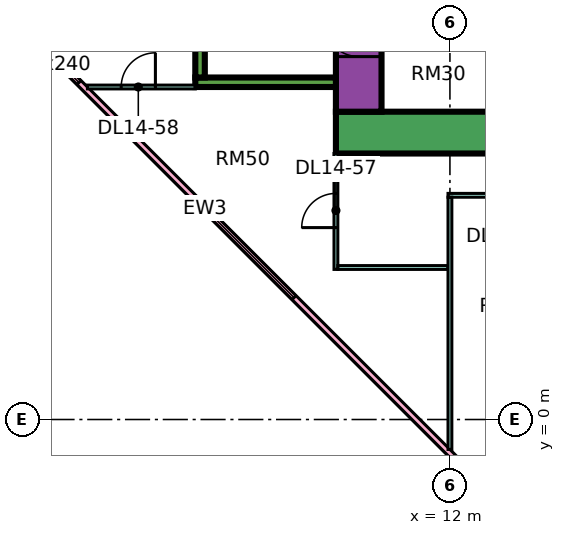
"""IFC4 building model, lengths in metres.
Left out: names, types, materials, properties, quantities, classifications, styles, units other than length and angle.
Written with IfcOpenShell. Run it as: python <this file> out.ifc"""

import sys

from ifc_helpers import new_model, si_unit, direction, frame, frame_2d, origin, place, context, subcontext, project, spatial, rectangle, extrude, element, fill, save


model = new_model("IFC4")
c1 = context("Model", 3, precision=1e-05, world=origin(), true_north=direction((0.0, 1.0)))
c2 = subcontext(c1, "Body", "Model", "MODEL_VIEW")
j1 = project(units=[si_unit("LENGTHUNIT", "METRE"), si_unit("PLANEANGLEUNIT", "RADIAN")], contexts=[c1])
p1 = place(None, origin())
s1 = spatial("IfcSite", under=j1, at=p1, CompositionType="ELEMENT")
p2 = place(p1, origin())
s2 = spatial("IfcBuilding", under=s1, at=p2, CompositionType="ELEMENT")
p3 = place(p2, frame((0.0, 0.0, 67.65)))
s3 = spatial("IfcBuildingStorey", under=s2, at=p3, CompositionType="ELEMENT", Elevation=67.65)
p4 = place(p3, frame((9.0, 7.55, 0.0), z_axis=(0.0, 0.0, 1.0), x_axis=(1.0, 0.0, 0.0)))
e1 = element("IfcWall", 1, at=p4, inside=s3, PredefinedType="SHEAR", context=c2, shape_type="SweptSolid", body=[
    extrude(rectangle(XDim=25.0, YDim=1.1, at=frame_2d((12.5, 0.0))), origin(), (0.0, 0.0, 1.0), 3.75),
])
p5 = place(p3, frame((9.6, 8.1, 0.0), z_axis=(0.0, 0.0, 1.0), x_axis=(0.0, 1.0, 0.0)))
e2 = element("IfcWall", 2, at=p5, inside=s3, PredefinedType="SHEAR", context=c2, shape_type="SweptSolid", body=[
    extrude(rectangle(XDim=10.8, YDim=1.2, at=frame_2d((5.4, 0.0))), origin(), (0.0, 0.0, 1.0), 3.75),
])
p6 = place(p5, frame((3.775, 0.0, 0.0)))
e3 = element("IfcOpeningElement", 3, at=p6, cuts=e2, PredefinedType="OPENING", context=c2, shape_type="SweptSolid", body=[
    extrude(rectangle(XDim=1.1, YDim=2.2, at=frame_2d((0.55, 1.1))), frame((0.0, 0.61, 0.0), z_axis=(0.0, -1.0, 0.0), x_axis=(1.0, 0.0, 0.0)), (0.0, 0.0, 1.0), 1.22),
])
p7 = place(p5, frame((6.275, 0.0, 0.0)))
e4 = element("IfcOpeningElement", 4, at=p7, cuts=e2, PredefinedType="OPENING", context=c2, shape_type="SweptSolid", body=[
    extrude(rectangle(XDim=1.1, YDim=2.2, at=frame_2d((0.55, 1.1))), frame((0.0, 0.61, 0.0), z_axis=(0.0, -1.0, 0.0), x_axis=(1.0, 0.0, 0.0)), (0.0, 0.0, 1.0), 1.22),
])
p8 = place(p5, frame((8.95, 0.0, 0.0)))
e5 = element("IfcOpeningElement", 5, at=p8, cuts=e2, PredefinedType="OPENING", context=c2, shape_type="SweptSolid", body=[
    extrude(rectangle(XDim=1.1, YDim=2.2, at=frame_2d((0.55, 1.1))), frame((0.0, 0.61, 0.0), z_axis=(0.0, -1.0, 0.0), x_axis=(1.0, 0.0, 0.0)), (0.0, 0.0, 1.0), 1.22),
])
p9 = place(p5, frame((1.45, 0.0, 0.0)))
e6 = element("IfcOpeningElement", 6, at=p9, cuts=e2, PredefinedType="OPENING", context=c2, shape_type="SweptSolid", body=[
    extrude(rectangle(XDim=0.9, YDim=2.1, at=frame_2d((0.45, 1.05))), frame((0.0, 0.61, 0.0), z_axis=(0.0, -1.0, 0.0), x_axis=(1.0, 0.0, 0.0)), (0.0, 0.0, 1.0), 1.22),
])
p10 = place(p3, frame((5.3, 8.875, 0.0), z_axis=(0.0, 0.0, 1.0), x_axis=(1.0, 0.0, 0.0)))
e7 = element("IfcWall", 7, at=p10, inside=s3, PredefinedType="SHEAR", context=c2, shape_type="SweptSolid", body=[
    extrude(rectangle(XDim=3.7, YDim=0.25, at=frame_2d((1.85, 0.0))), origin(), (0.0, 0.0, 1.0), 3.75),
])
p11 = place(p3, frame((5.425, 9.0, 0.0), z_axis=(0.0, 0.0, 1.0), x_axis=(0.0, 1.0, 0.0)))
e8 = element("IfcWall", 8, at=p11, inside=s3, PredefinedType="SHEAR", context=c2, shape_type="SweptSolid", body=[
    extrude(rectangle(XDim=4.0, YDim=0.25, at=frame_2d((2.0, 0.0))), origin(), (0.0, 0.0, 1.0), 3.75),
])
p12 = place(p3, frame((-1.447, 12.553, 0.0), z_axis=(0.0, 0.0, 1.0), x_axis=(0.707106781187, -0.707106781187, 0.0)))
e9 = element("IfcWall", 9, at=p12, inside=s3, PredefinedType="SOLIDWALL", context=c2, shape_type="SweptSolid", body=[
    extrude(rectangle(XDim=19.799, YDim=0.15, at=frame_2d((9.899, 0.0))), origin(), (0.0, 0.0, 1.0), 3.35),
])
p13 = place(p12, frame((2.212, 0.0, 0.45)))
e10 = element("IfcOpeningElement", 10, at=p13, cuts=e9, PredefinedType="OPENING", context=c2, shape_type="SweptSolid", body=[
    extrude(rectangle(XDim=3.0, YDim=2.4, at=frame_2d((1.5, 1.2))), frame((0.0, 0.085, 0.0), z_axis=(0.0, -1.0, 0.0), x_axis=(1.0, 0.0, 0.0)), (0.0, 0.0, 1.0), 0.17),
])
p14 = place(p12, frame((10.216, 0.0, 0.45)))
e11 = element("IfcOpeningElement", 11, at=p14, cuts=e9, PredefinedType="OPENING", context=c2, shape_type="SweptSolid", body=[
    extrude(rectangle(XDim=3.0, YDim=2.4, at=frame_2d((1.5, 1.2))), frame((0.0, 0.085, 0.0), z_axis=(0.0, -1.0, 0.0), x_axis=(1.0, 0.0, 0.0)), (0.0, 0.0, 1.0), 0.17),
])
p15 = place(p3, frame((2.461, 8.75, 0.0), z_axis=(0.0, 0.0, 1.0), x_axis=(1.0, 0.0, 0.0)))
e12 = element("IfcWall", 12, at=p15, inside=s3, PredefinedType="PARTITIONING", context=c2, shape_type="SweptSolid", body=[
    extrude(rectangle(XDim=2.839, YDim=0.1, at=frame_2d((1.419, 0.0))), origin(), (0.0, 0.0, 1.0), 3.35),
])
p16 = place(p15, frame((0.889, 0.0, 0.0)))
e13 = element("IfcOpeningElement", 13, at=p16, cuts=e12, PredefinedType="OPENING", context=c2, shape_type="SweptSolid", body=[
    extrude(rectangle(XDim=0.9, YDim=2.1, at=frame_2d((0.45, 1.05))), frame((0.0, 0.06, 0.0), z_axis=(0.0, -1.0, 0.0), x_axis=(1.0, 0.0, 0.0)), (0.0, 0.0, 1.0), 0.12),
])
p17 = place(p3, frame((9.0, 3.95, 0.0), z_axis=(0.0, 0.0, 1.0), x_axis=(0.0, 1.0, 0.0)))
e14 = element("IfcWall", 14, at=p17, inside=s3, PredefinedType="PARTITIONING", context=c2, shape_type="SweptSolid", body=[
    extrude(rectangle(XDim=3.05, YDim=0.1, at=frame_2d((1.525, 0.0))), origin(), (0.0, 0.0, 1.0), 3.35),
])
p18 = place(p17, frame((1.1, 0.0, 0.0)))
e15 = element("IfcOpeningElement", 15, at=p18, cuts=e14, PredefinedType="OPENING", context=c2, shape_type="SweptSolid", body=[
    extrude(rectangle(XDim=0.9, YDim=2.1, at=frame_2d((0.45, 1.05))), frame((0.0, 0.06, 0.0), z_axis=(0.0, -1.0, 0.0), x_axis=(1.0, 0.0, 0.0)), (0.0, 0.0, 1.0), 0.12),
])
p19 = place(p3, frame((9.05, 4.0, 0.0), z_axis=(0.0, 0.0, 1.0), x_axis=(1.0, 0.0, 0.0)))
e16 = element("IfcWall", 16, at=p19, inside=s3, PredefinedType="PARTITIONING", context=c2, shape_type="SweptSolid", body=[
    extrude(rectangle(XDim=2.9, YDim=0.1, at=frame_2d((1.45, 0.0))), origin(), (0.0, 0.0, 1.0), 3.35),
])
p20 = place(p3, frame((11.95, 5.9, 0.0), z_axis=(0.0, 0.0, 1.0), x_axis=(1.0, 0.0, 0.0)))
e17 = element("IfcWall", 17, at=p20, inside=s3, PredefinedType="PARTITIONING", context=c2, shape_type="SweptSolid", body=[
    extrude(rectangle(XDim=21.1, YDim=0.1, at=frame_2d((10.55, 0.0))), origin(), (0.0, 0.0, 1.0), 3.35),
])
p21 = place(p20, frame((1.1, 0.0, 0.0)))
e18 = element("IfcOpeningElement", 18, at=p21, cuts=e17, PredefinedType="OPENING", context=c2, shape_type="SweptSolid", body=[
    extrude(rectangle(XDim=0.9, YDim=2.1, at=frame_2d((0.45, 1.05))), frame((0.0, 0.06, 0.0), z_axis=(0.0, -1.0, 0.0), x_axis=(1.0, 0.0, 0.0)), (0.0, 0.0, 1.0), 0.12),
])
p22 = place(p20, frame((4.1, 0.0, 0.0)))
e19 = element("IfcOpeningElement", 19, at=p22, cuts=e17, PredefinedType="OPENING", context=c2, shape_type="SweptSolid", body=[
    extrude(rectangle(XDim=0.9, YDim=2.1, at=frame_2d((0.45, 1.05))), frame((0.0, 0.06, 0.0), z_axis=(0.0, -1.0, 0.0), x_axis=(1.0, 0.0, 0.0)), (0.0, 0.0, 1.0), 0.12),
])
p23 = place(p20, frame((7.1, 0.0, 0.0)))
e20 = element("IfcOpeningElement", 20, at=p23, cuts=e17, PredefinedType="OPENING", context=c2, shape_type="SweptSolid", body=[
    extrude(rectangle(XDim=0.9, YDim=2.1, at=frame_2d((0.45, 1.05))), frame((0.0, 0.06, 0.0), z_axis=(0.0, -1.0, 0.0), x_axis=(1.0, 0.0, 0.0)), (0.0, 0.0, 1.0), 0.12),
])
p24 = place(p20, frame((10.1, 0.0, 0.0)))
e21 = element("IfcOpeningElement", 21, at=p24, cuts=e17, PredefinedType="OPENING", context=c2, shape_type="SweptSolid", body=[
    extrude(rectangle(XDim=0.9, YDim=2.1, at=frame_2d((0.45, 1.05))), frame((0.0, 0.06, 0.0), z_axis=(0.0, -1.0, 0.0), x_axis=(1.0, 0.0, 0.0)), (0.0, 0.0, 1.0), 0.12),
])
p25 = place(p20, frame((16.1, 0.0, 0.0)))
e22 = element("IfcOpeningElement", 22, at=p25, cuts=e17, PredefinedType="OPENING", context=c2, shape_type="SweptSolid", body=[
    extrude(rectangle(XDim=0.9, YDim=2.1, at=frame_2d((0.45, 1.05))), frame((0.0, 0.06, 0.0), z_axis=(0.0, -1.0, 0.0), x_axis=(1.0, 0.0, 0.0)), (0.0, 0.0, 1.0), 0.12),
])
p26 = place(p3, frame((12.0, -0.788, 0.0), z_axis=(0.0, 0.0, 1.0), x_axis=(0.0, 1.0, 0.0)))
e23 = element("IfcWall", 23, at=p26, inside=s3, PredefinedType="PARTITIONING", context=c2, shape_type="SweptSolid", body=[
    extrude(rectangle(XDim=6.638, YDim=0.1, at=frame_2d((3.319, 0.0))), origin(), (0.0, 0.0, 1.0), 3.35),
])
p27 = place(p13, origin())
e24 = element("IfcWindow", 24, at=p27, inside=s3, PartitioningType="SINGLE_PANEL", PredefinedType="WINDOW", context=c2, shape_type="SweptSolid", body=[
    extrude(rectangle(XDim=3.0, YDim=2.4, at=frame_2d((1.5, 1.2))), frame((0.0, 0.03, 0.0), z_axis=(0.0, -1.0, 0.0), x_axis=(1.0, 0.0, 0.0)), (0.0, 0.0, 1.0), 0.06),
])
fill(e10, e24)
p28 = place(p14, origin())
e25 = element("IfcWindow", 25, at=p28, inside=s3, PartitioningType="SINGLE_PANEL", PredefinedType="WINDOW", context=c2, shape_type="SweptSolid", body=[
    extrude(rectangle(XDim=3.0, YDim=2.4, at=frame_2d((1.5, 1.2))), frame((0.0, 0.03, 0.0), z_axis=(0.0, -1.0, 0.0), x_axis=(1.0, 0.0, 0.0)), (0.0, 0.0, 1.0), 0.06),
])
fill(e11, e25)
p29 = place(p9, frame((0.9, 0.0, 0.0), z_axis=(0.0, 0.0, 1.0), x_axis=(-1.0, 0.0, 0.0)))
e26 = element("IfcDoor", 26, at=p29, inside=s3, OperationType="SINGLE_SWING_RIGHT", PredefinedType="DOOR", context=c2, shape_type="SweptSolid", body=[
    extrude(rectangle(XDim=0.9, YDim=2.1, at=frame_2d((0.45, 1.05))), frame((0.0, 0.025, 0.0), z_axis=(0.0, -1.0, 0.0), x_axis=(1.0, 0.0, 0.0)), (0.0, 0.0, 1.0), 0.05),
])
fill(e6, e26)
p30 = place(p18, origin())
e27 = element("IfcDoor", 27, at=p30, inside=s3, OperationType="SINGLE_SWING_LEFT", PredefinedType="DOOR", context=c2, shape_type="SweptSolid", body=[
    extrude(rectangle(XDim=0.9, YDim=2.1, at=frame_2d((0.45, 1.05))), frame((0.0, 0.025, 0.0), z_axis=(0.0, -1.0, 0.0), x_axis=(1.0, 0.0, 0.0)), (0.0, 0.0, 1.0), 0.05),
])
fill(e15, e27)
p31 = place(p16, frame((0.9, 0.0, 0.0), z_axis=(0.0, 0.0, 1.0), x_axis=(-1.0, 0.0, 0.0)))
e28 = element("IfcDoor", 28, at=p31, inside=s3, OperationType="SINGLE_SWING_RIGHT", PredefinedType="DOOR", context=c2, shape_type="SweptSolid", body=[
    extrude(rectangle(XDim=0.9, YDim=2.1, at=frame_2d((0.45, 1.05))), frame((0.0, 0.025, 0.0), z_axis=(0.0, -1.0, 0.0), x_axis=(1.0, 0.0, 0.0)), (0.0, 0.0, 1.0), 0.05),
])
fill(e13, e28)
save(model, sys.argv[1])
